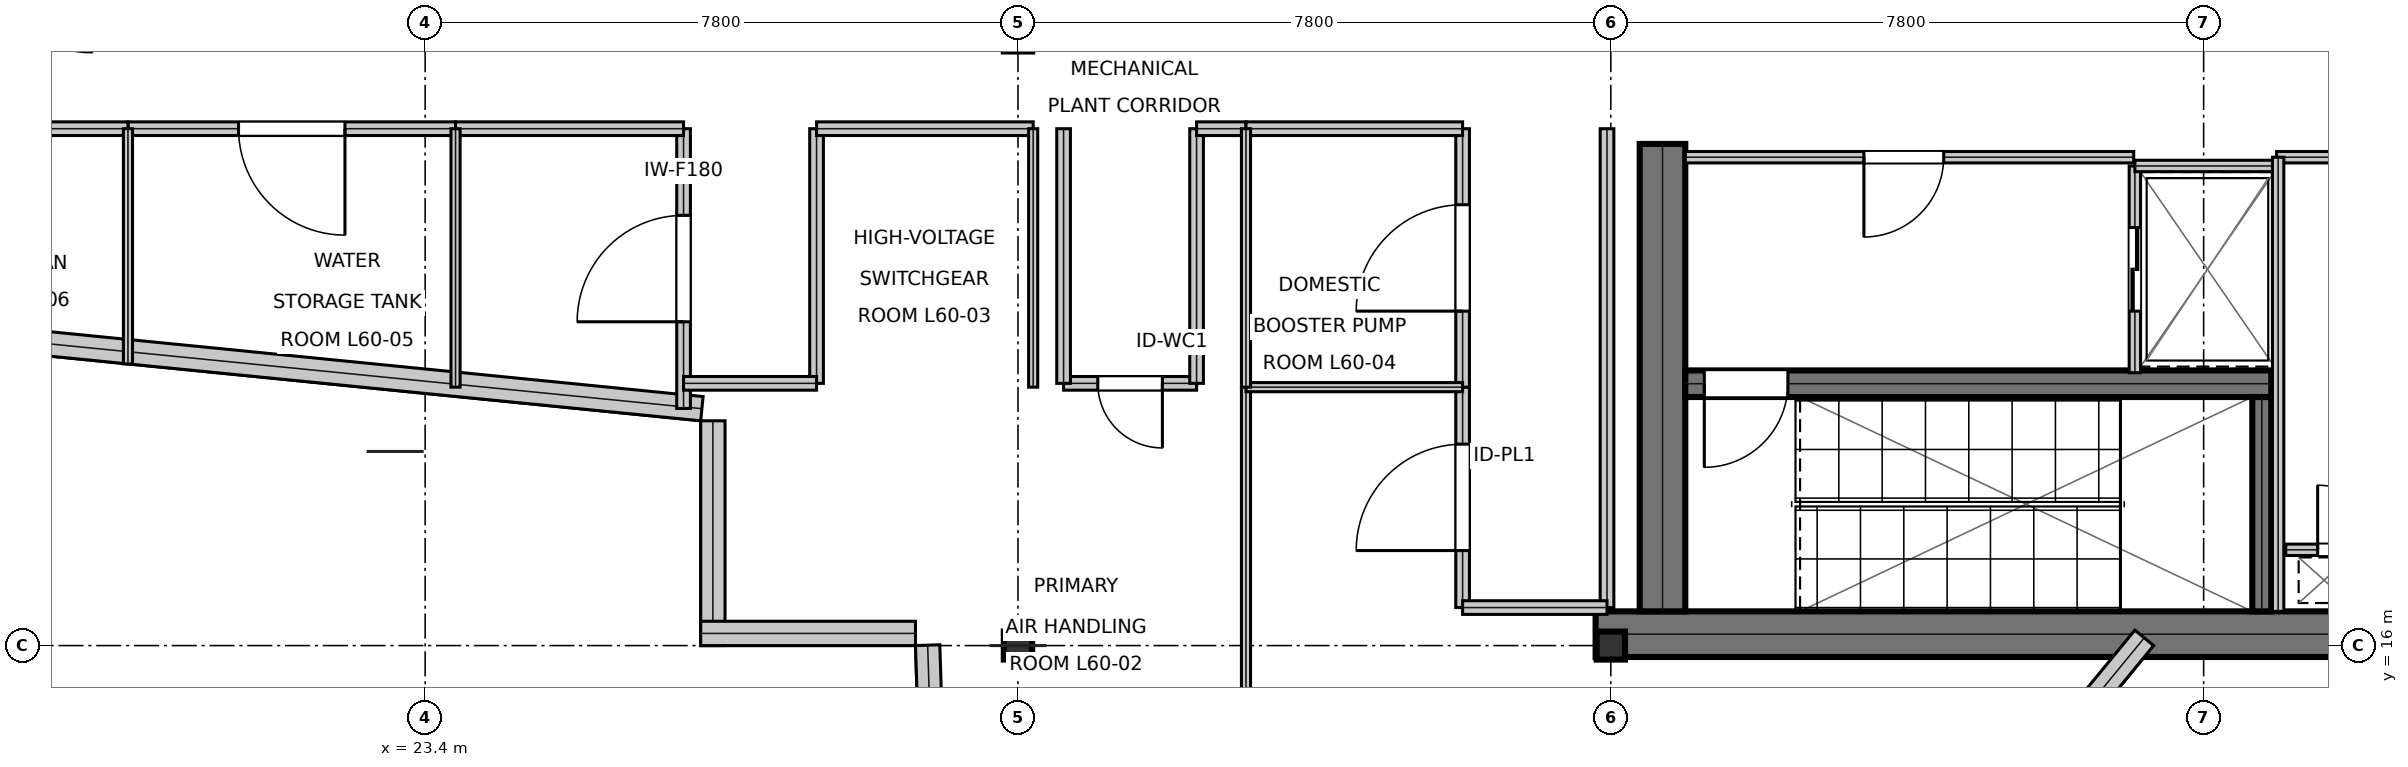
"""IFC4 building model, lengths in metres.
Left out: names, types, materials, properties, quantities, classifications, styles, units other than length and angle.
Written with IfcOpenShell. Run it as: python <this file> out.ifc"""

import sys

from ifc_helpers import new_model, si_unit, direction, frame, frame_2d, origin, origin_2d, place, context, subcontext, project, spatial, rectangle, i_section, extrude, element, fill, save


model = new_model("IFC4")
c1 = context("Model", 3, precision=1e-05, world=origin(), true_north=direction((0.0, 1.0)))
c2 = subcontext(c1, "Body", "Model", "MODEL_VIEW")
j1 = project(units=[si_unit("LENGTHUNIT", "METRE"), si_unit("PLANEANGLEUNIT", "RADIAN")], contexts=[c1])
p1 = place(None, origin())
s1 = spatial("IfcSite", under=j1, at=p1, CompositionType="ELEMENT")
p2 = place(p1, origin())
s2 = spatial("IfcBuilding", under=s1, at=p2, CompositionType="ELEMENT")
p3 = place(p2, frame((0.0, 0.0, 256.65)))
s3 = spatial("IfcBuildingStorey", under=s2, at=p3, CompositionType="ELEMENT", Elevation=256.65)
p4 = place(p3, frame((38.8, 16.15, 0.0), z_axis=(0.0, 0.0, 1.0), x_axis=(1.0, 0.0, 0.0)))
e1 = element("IfcWall", 1, at=p4, inside=s3, PredefinedType="SHEAR", context=c2, shape_type="SweptSolid", body=[
    extrude(rectangle(XDim=16.0, YDim=0.6, at=frame_2d((8.0, 0.0))), origin(), (0.0, 0.0, 1.0), 5.12),
])
p5 = place(p3, frame((39.68, 16.45, 0.0), z_axis=(0.0, 0.0, 1.0), x_axis=(0.0, 1.0, 0.0)))
e2 = element("IfcWall", 2, at=p5, inside=s3, PredefinedType="SHEAR", context=c2, shape_type="SweptSolid", body=[
    extrude(rectangle(XDim=6.15, YDim=0.6, at=frame_2d((3.075, 0.0))), origin(), (0.0, 0.0, 1.0), 5.12),
])
p6 = place(p3, frame((39.98, 19.445, 0.0), z_axis=(0.0, 0.0, 1.0), x_axis=(1.0, 0.0, 0.0)))
e3 = element("IfcWall", 3, at=p6, inside=s3, PredefinedType="SHEAR", context=c2, shape_type="SweptSolid", body=[
    extrude(rectangle(XDim=7.71, YDim=0.35, at=frame_2d((3.855, 0.0))), origin(), (0.0, 0.0, 1.0), 5.12),
])
p7 = place(p6, frame((0.25, 0.0, 0.0)))
e4 = element("IfcOpeningElement", 4, at=p7, cuts=e3, PredefinedType="OPENING", context=c2, shape_type="SweptSolid", body=[
    extrude(rectangle(XDim=1.1, YDim=2.15, at=frame_2d((0.55, 1.075))), frame((0.0, 0.185, 0.0), z_axis=(0.0, -1.0, 0.0), x_axis=(1.0, 0.0, 0.0)), (0.0, 0.0, 1.0), 0.37),
])
p8 = place(p3, frame((47.565, 16.45, 0.0), z_axis=(0.0, 0.0, 1.0), x_axis=(0.0, 1.0, 0.0)))
e5 = element("IfcWall", 5, at=p8, inside=s3, PredefinedType="SHEAR", context=c2, shape_type="SweptSolid", body=[
    extrude(rectangle(XDim=2.82, YDim=0.25, at=frame_2d((1.41, 0.0))), origin(), (0.0, 0.0, 1.0), 5.12),
])
for number, where, z_axis, x_axis in (
    (6, (31.2, 16.0, 0.0), (0.0, 0.0, 1.0), (1.0, 0.0, 0.0)),
    (7, (39.0, 16.0, 0.0), (0.0, 0.0, 1.0), (1.0, 0.0, 0.0)),
):
    element("IfcColumn", number, at=place(p3, frame(where, z_axis=z_axis, x_axis=x_axis)), inside=s3, PredefinedType="COLUMN", context=c2, shape_type="SweptSolid", body=[
        extrude(i_section(OverallWidth=0.373, OverallDepth=0.368, WebThickness=0.015, FlangeThickness=0.024, at=origin_2d()), origin(), (0.0, 0.0, 1.0), 5.394),
    ])
p9 = place(p3, frame((16.376, 20.176, 0.0), z_axis=(0.0, 0.0, 1.0), x_axis=(0.995106185687, -0.098811331369, 0.0)))
e8 = element("IfcWall", 8, at=p9, inside=s3, PredefinedType="STANDARD", context=c2, shape_type="SweptSolid", body=[
    extrude(rectangle(XDim=10.718, YDim=0.32, at=frame_2d((5.359, 0.0))), origin(), (0.0, 0.0, 1.0), 4.649),
])
p10 = place(p3, frame((27.186, 18.958, 0.0), z_axis=(0.0, 0.0, 1.0), x_axis=(0.0, -1.0, 0.0)))
e9 = element("IfcWall", 9, at=p10, inside=s3, PredefinedType="STANDARD", context=c2, shape_type="SweptSolid", body=[
    extrude(rectangle(XDim=2.958, YDim=0.32, at=frame_2d((1.479, 0.0))), origin(), (0.0, 0.0, 1.0), 4.649),
])
p11 = place(p3, frame((27.026, 16.16, 0.0), z_axis=(0.0, 0.0, 1.0), x_axis=(1.0, 0.0, 0.0)))
e10 = element("IfcWall", 10, at=p11, inside=s3, PredefinedType="STANDARD", context=c2, shape_type="SweptSolid", body=[
    extrude(rectangle(XDim=2.826, YDim=0.32, at=frame_2d((1.413, 0.0))), origin(), (0.0, 0.0, 1.0), 5.12),
])
p12 = place(p3, frame((30.012, 16.005, 0.0), z_axis=(0.0, 0.0, 1.0), x_axis=(0.032564460351, -0.999469637319, 0.0)))
e11 = element("IfcWall", 11, at=p12, inside=s3, PredefinedType="STANDARD", context=c2, shape_type="SweptSolid", body=[
    extrude(rectangle(XDim=6.403, YDim=0.32, at=frame_2d((3.201, 0.0))), origin(), (0.0, 0.0, 1.0), 5.12),
])
p13 = place(p3, frame((40.838, 9.801, 0.0), z_axis=(0.0, 0.0, 1.0), x_axis=(0.635089129199, 0.772438863583, 0.0)))
e12 = element("IfcWall", 12, at=p13, inside=s3, PredefinedType="STANDARD", context=c2, shape_type="SweptSolid", body=[
    extrude(rectangle(XDim=8.157, YDim=0.32, at=frame_2d((4.079, 0.0))), origin(), (0.0, 0.0, 1.0), 4.649),
])
p14 = place(p3, frame((39.98, 22.425, 0.0), z_axis=(0.0, 0.0, 1.0), x_axis=(1.0, 0.0, 0.0)))
e13 = element("IfcWall", 13, at=p14, inside=s3, PredefinedType="PARTITIONING", context=c2, shape_type="SweptSolid", body=[
    extrude(rectangle(XDim=5.9, YDim=0.15, at=frame_2d((2.95, 0.0))), origin(), (0.0, 0.0, 1.0), 5.12),
])
p15 = place(p14, frame((2.35, 0.0, 0.0)))
e14 = element("IfcOpeningElement", 14, at=p15, cuts=e13, PredefinedType="OPENING", context=c2, shape_type="SweptSolid", body=[
    extrude(rectangle(XDim=1.05, YDim=2.15, at=frame_2d((0.525, 1.075))), frame((0.0, 0.085, 0.0), z_axis=(0.0, -1.0, 0.0), x_axis=(1.0, 0.0, 0.0)), (0.0, 0.0, 1.0), 0.17),
])
p16 = place(p3, frame((45.895, 19.59, 0.0), z_axis=(0.0, 0.0, 1.0), x_axis=(0.0, 1.0, 0.0)))
e15 = element("IfcWall", 15, at=p16, inside=s3, PredefinedType="PARTITIONING", context=c2, shape_type="SweptSolid", body=[
    extrude(rectangle(XDim=2.72, YDim=0.15, at=frame_2d((1.36, 0.0))), origin(), (0.0, 0.0, 1.0), 5.12),
])
p17 = place(p16, frame((0.81, 0.0, 0.0)))
e16 = element("IfcOpeningElement", 16, at=p17, cuts=e15, PredefinedType="OPENING", context=c2, shape_type="SweptSolid", body=[
    extrude(rectangle(XDim=1.1, YDim=2.15, at=frame_2d((0.55, 1.075))), frame((0.0, 0.085, 0.0), z_axis=(0.0, -1.0, 0.0), x_axis=(1.0, 0.0, 0.0)), (0.0, 0.0, 1.0), 0.17),
])
p18 = place(p3, frame((45.895, 22.31, 0.0), z_axis=(0.0, 0.0, 1.0), x_axis=(1.0, 0.0, 0.0)))
e17 = element("IfcWall", 17, at=p18, inside=s3, PredefinedType="PARTITIONING", context=c2, shape_type="SweptSolid", body=[
    extrude(rectangle(XDim=1.915, YDim=0.15, at=frame_2d((0.958, 0.0))), origin(), (0.0, 0.0, 1.0), 5.12),
])
p19 = place(p3, frame((47.88, 17.26, 0.0), z_axis=(0.0, 0.0, 1.0), x_axis=(1.0, 0.0, 0.0)))
e18 = element("IfcWall", 18, at=p19, inside=s3, PredefinedType="PARTITIONING", context=c2, shape_type="SweptSolid", body=[
    extrude(rectangle(XDim=1.72, YDim=0.15, at=frame_2d((0.86, 0.0))), origin(), (0.0, 0.0, 1.0), 5.12),
])
p20 = place(p19, frame((0.42, 0.0, 0.0)))
e19 = element("IfcOpeningElement", 19, at=p20, cuts=e18, PredefinedType="OPENING", context=c2, shape_type="SweptSolid", body=[
    extrude(rectangle(XDim=0.85, YDim=2.15, at=frame_2d((0.425, 1.075))), frame((0.0, 0.085, 0.0), z_axis=(0.0, -1.0, 0.0), x_axis=(1.0, 0.0, 0.0)), (0.0, 0.0, 1.0), 0.17),
])
p21 = place(p3, frame((47.76, 22.425, 0.0), z_axis=(0.0, 0.0, 1.0), x_axis=(1.0, 0.0, 0.0)))
e20 = element("IfcWall", 20, at=p21, inside=s3, PredefinedType="PARTITIONING", context=c2, shape_type="SweptSolid", body=[
    extrude(rectangle(XDim=1.96, YDim=0.15, at=frame_2d((0.98, 0.0))), origin(), (0.0, 0.0, 1.0), 5.12),
])
p22 = place(p3, frame((47.78, 16.45, 0.0), z_axis=(0.0, 0.0, 1.0), x_axis=(0.0, 1.0, 0.0)))
e21 = element("IfcWall", 21, at=p22, inside=s3, PredefinedType="PARTITIONING", context=c2, shape_type="SweptSolid", body=[
    extrude(rectangle(XDim=5.975, YDim=0.15, at=frame_2d((2.988, 0.0))), origin(), (0.0, 0.0, 1.0), 5.12),
])
p23 = place(p3, frame((37.05, 16.5, 0.0), z_axis=(0.0, 0.0, 1.0), x_axis=(0.0, 1.0, 0.0)))
e22 = element("IfcWall", 22, at=p23, inside=s3, PredefinedType="SOLIDWALL", context=c2, shape_type="SweptSolid", body=[
    extrude(rectangle(XDim=2.9, YDim=0.18, at=frame_2d((1.45, 0.0))), origin(), (0.0, 0.0, 1.0), 4.85),
])
p24 = place(p23, frame((0.75, 0.0, 0.0)))
e23 = element("IfcOpeningElement", 23, at=p24, cuts=e22, PredefinedType="OPENING", context=c2, shape_type="SweptSolid", body=[
    extrude(rectangle(XDim=1.4, YDim=2.2, at=frame_2d((0.7, 1.1))), frame((0.0, 0.1, 0.0), z_axis=(0.0, -1.0, 0.0), x_axis=(1.0, 0.0, 0.0)), (0.0, 0.0, 1.0), 0.2),
])
p25 = place(p3, frame((31.8, 19.45, 0.0), z_axis=(0.0, 0.0, 1.0), x_axis=(1.0, 0.0, 0.0)))
e24 = element("IfcWall", 24, at=p25, inside=s3, PredefinedType="SOLIDWALL", context=c2, shape_type="SweptSolid", body=[
    extrude(rectangle(XDim=1.75, YDim=0.18, at=frame_2d((0.875, 0.0))), origin(), (0.0, 0.0, 1.0), 5.12),
])
p26 = place(p25, frame((0.45, 0.0, 0.0)))
e25 = element("IfcOpeningElement", 25, at=p26, cuts=e24, PredefinedType="OPENING", context=c2, shape_type="SweptSolid", body=[
    extrude(rectangle(XDim=0.85, YDim=2.15, at=frame_2d((0.425, 1.075))), frame((0.0, 0.1, 0.0), z_axis=(0.0, -1.0, 0.0), x_axis=(1.0, 0.0, 0.0)), (0.0, 0.0, 1.0), 0.2),
])
p27 = place(p3, frame((26.8, 19.12, 0.0), z_axis=(0.0, 0.0, 1.0), x_axis=(0.0, 1.0, 0.0)))
e26 = element("IfcWall", 26, at=p27, inside=s3, PredefinedType="SOLIDWALL", context=c2, shape_type="SweptSolid", body=[
    extrude(rectangle(XDim=3.68, YDim=0.18, at=frame_2d((1.84, 0.0))), origin(), (0.0, 0.0, 1.0), 5.12),
])
p28 = place(p27, frame((1.14, 0.0, 0.0)))
e27 = element("IfcOpeningElement", 27, at=p28, cuts=e26, PredefinedType="OPENING", context=c2, shape_type="SweptSolid", body=[
    extrude(rectangle(XDim=1.4, YDim=2.2, at=frame_2d((0.7, 1.1))), frame((0.0, 0.1, 0.0), z_axis=(0.0, -1.0, 0.0), x_axis=(1.0, 0.0, 0.0)), (0.0, 0.0, 1.0), 0.2),
])
p29 = place(p3, frame((37.05, 19.4, 0.0), z_axis=(0.0, 0.0, 1.0), x_axis=(0.0, 1.0, 0.0)))
e28 = element("IfcWall", 28, at=p29, inside=s3, PredefinedType="SOLIDWALL", context=c2, shape_type="SweptSolid", body=[
    extrude(rectangle(XDim=3.4, YDim=0.18, at=frame_2d((1.7, 0.0))), origin(), (0.0, 0.0, 1.0), 4.85),
])
p30 = place(p29, frame((1.0, 0.0, 0.0)))
e29 = element("IfcOpeningElement", 29, at=p30, cuts=e28, PredefinedType="OPENING", context=c2, shape_type="SweptSolid", body=[
    extrude(rectangle(XDim=1.4, YDim=2.2, at=frame_2d((0.7, 1.1))), frame((0.0, 0.1, 0.0), z_axis=(0.0, -1.0, 0.0), x_axis=(1.0, 0.0, 0.0)), (0.0, 0.0, 1.0), 0.2),
])
p31 = place(p3, frame((19.49, 22.8, 0.0), z_axis=(0.0, 0.0, 1.0), x_axis=(1.0, 0.0, 0.0)))
e30 = element("IfcWall", 30, at=p31, inside=s3, PredefinedType="SOLIDWALL", context=c2, shape_type="SweptSolid", body=[
    extrude(rectangle(XDim=4.31, YDim=0.18, at=frame_2d((2.155, 0.0))), origin(), (0.0, 0.0, 1.0), 4.58),
])
p32 = place(p31, frame((1.455, 0.0, 0.0)))
e31 = element("IfcOpeningElement", 31, at=p32, cuts=e30, PredefinedType="OPENING", context=c2, shape_type="SweptSolid", body=[
    extrude(rectangle(XDim=1.4, YDim=2.2, at=frame_2d((0.7, 1.1))), frame((0.0, 0.1, 0.0), z_axis=(0.0, -1.0, 0.0), x_axis=(1.0, 0.0, 0.0)), (0.0, 0.0, 1.0), 0.2),
])
p33 = place(p3, frame((38.95, 16.5, 0.0), z_axis=(0.0, 0.0, 1.0), x_axis=(0.0, 1.0, 0.0)))
e32 = element("IfcWall", 32, at=p33, inside=s3, PredefinedType="SOLIDWALL", context=c2, shape_type="SweptSolid", body=[
    extrude(rectangle(XDim=6.3, YDim=0.18, at=frame_2d((3.15, 0.0))), origin(), (0.0, 0.0, 1.0), 4.85),
])
p34 = place(p3, frame((37.05, 16.5, 0.0), z_axis=(0.0, 0.0, 1.0), x_axis=(1.0, 0.0, 0.0)))
e33 = element("IfcWall", 33, at=p34, inside=s3, PredefinedType="SOLIDWALL", context=c2, shape_type="SweptSolid", body=[
    extrude(rectangle(XDim=1.9, YDim=0.18, at=frame_2d((0.95, 0.0))), origin(), (0.0, 0.0, 1.0), 5.12),
])
for number, where, z_axis, x_axis in (
    (34, (33.55, 19.45, 0.0), (0.0, 0.0, 1.0), (0.0, 1.0, 0.0)),
    (35, (31.8, 19.45, 0.0), (0.0, 0.0, 1.0), (0.0, 1.0, 0.0)),
):
    element("IfcWall", number, at=place(p3, frame(where, z_axis=z_axis, x_axis=x_axis)), inside=s3, PredefinedType="SOLIDWALL", context=c2, shape_type="SweptSolid", body=[
        extrude(rectangle(XDim=3.35, YDim=0.18, at=frame_2d((1.675, 0.0))), origin(), (0.0, 0.0, 1.0), 4.85),
    ])
p35 = place(p3, frame((33.55, 22.8, 0.0), z_axis=(0.0, 0.0, 1.0), x_axis=(1.0, 0.0, 0.0)))
e36 = element("IfcWall", 36, at=p35, inside=s3, PredefinedType="SOLIDWALL", context=c2, shape_type="SweptSolid", body=[
    extrude(rectangle(XDim=0.65, YDim=0.18, at=frame_2d((0.325, 0.0))), origin(), (0.0, 0.0, 1.0), 5.12),
])
p36 = place(p3, frame((28.55, 19.45, 0.0), z_axis=(0.0, 0.0, 1.0), x_axis=(0.0, 1.0, 0.0)))
e37 = element("IfcWall", 37, at=p36, inside=s3, PredefinedType="SOLIDWALL", context=c2, shape_type="SweptSolid", body=[
    extrude(rectangle(XDim=3.35, YDim=0.18, at=frame_2d((1.675, 0.0))), origin(), (0.0, 0.0, 1.0), 5.12),
])
p37 = place(p3, frame((23.8, 22.8, 0.0), z_axis=(0.0, 0.0, 1.0), x_axis=(1.0, 0.0, 0.0)))
e38 = element("IfcWall", 38, at=p37, inside=s3, PredefinedType="SOLIDWALL", context=c2, shape_type="SweptSolid", body=[
    extrude(rectangle(XDim=3.0, YDim=0.18, at=frame_2d((1.5, 0.0))), origin(), (0.0, 0.0, 1.0), 4.58),
])
p38 = place(p3, frame((28.55, 22.8, 0.0), z_axis=(0.0, 0.0, 1.0), x_axis=(1.0, 0.0, 0.0)))
e39 = element("IfcWall", 39, at=p38, inside=s3, PredefinedType="SOLIDWALL", context=c2, shape_type="SweptSolid", body=[
    extrude(rectangle(XDim=2.85, YDim=0.18, at=frame_2d((1.425, 0.0))), origin(), (0.0, 0.0, 1.0), 4.58),
])
p39 = place(p3, frame((26.8, 19.45, 0.0), z_axis=(0.0, 0.0, 1.0), x_axis=(1.0, 0.0, 0.0)))
e40 = element("IfcWall", 40, at=p39, inside=s3, PredefinedType="SOLIDWALL", context=c2, shape_type="SweptSolid", body=[
    extrude(rectangle(XDim=1.75, YDim=0.18, at=frame_2d((0.875, 0.0))), origin(), (0.0, 0.0, 1.0), 5.12),
])
p40 = place(p3, frame((34.2, 22.8, 0.0), z_axis=(0.0, 0.0, 1.0), x_axis=(1.0, 0.0, 0.0)))
e41 = element("IfcWall", 41, at=p40, inside=s3, PredefinedType="SOLIDWALL", context=c2, shape_type="SweptSolid", body=[
    extrude(rectangle(XDim=2.85, YDim=0.18, at=frame_2d((1.425, 0.0))), origin(), (0.0, 0.0, 1.0), 5.12),
])
p41 = place(p3, frame((16.5, 22.8, 0.0), z_axis=(0.0, 0.0, 1.0), x_axis=(1.0, 0.0, 0.0)))
e42 = element("IfcWall", 42, at=p41, inside=s3, PredefinedType="SOLIDWALL", context=c2, shape_type="SweptSolid", body=[
    extrude(rectangle(XDim=2.99, YDim=0.18, at=frame_2d((1.495, 0.0))), origin(), (0.0, 0.0, 1.0), 5.12),
])
p42 = place(p3, frame((34.2, 8.854, 0.0), z_axis=(0.0, 0.0, 1.0), x_axis=(0.0, 1.0, 0.0)))
e43 = element("IfcWall", 43, at=p42, inside=s3, PredefinedType="PARTITIONING", context=c2, shape_type="SweptSolid", body=[
    extrude(rectangle(XDim=10.546, YDim=0.12, at=frame_2d((5.273, 0.0))), origin(), (0.0, 0.0, 1.0), 4.58),
])
p43 = place(p3, frame((34.2, 19.4, 0.0), z_axis=(0.0, 0.0, 1.0), x_axis=(1.0, 0.0, 0.0)))
e44 = element("IfcWall", 44, at=p43, inside=s3, PredefinedType="PARTITIONING", context=c2, shape_type="SweptSolid", body=[
    extrude(rectangle(XDim=2.85, YDim=0.12, at=frame_2d((1.425, 0.0))), origin(), (0.0, 0.0, 1.0), 5.12),
])
p44 = place(p3, frame((31.4, 19.4, 0.0), z_axis=(0.0, 0.0, 1.0), x_axis=(0.0, 1.0, 0.0)))
e45 = element("IfcWall", 45, at=p44, inside=s3, PredefinedType="PARTITIONING", context=c2, shape_type="SweptSolid", body=[
    extrude(rectangle(XDim=3.4, YDim=0.12, at=frame_2d((1.7, 0.0))), origin(), (0.0, 0.0, 1.0), 4.58),
])
p45 = place(p3, frame((34.2, 19.4, 0.0), z_axis=(0.0, 0.0, 1.0), x_axis=(0.0, 1.0, 0.0)))
e46 = element("IfcWall", 46, at=p45, inside=s3, PredefinedType="PARTITIONING", context=c2, shape_type="SweptSolid", body=[
    extrude(rectangle(XDim=3.4, YDim=0.12, at=frame_2d((1.7, 0.0))), origin(), (0.0, 0.0, 1.0), 5.12),
])
p46 = place(p3, frame((23.8, 19.4, 0.0), z_axis=(0.0, 0.0, 1.0), x_axis=(0.0, 1.0, 0.0)))
e47 = element("IfcWall", 47, at=p46, inside=s3, PredefinedType="PARTITIONING", context=c2, shape_type="SweptSolid", body=[
    extrude(rectangle(XDim=3.4, YDim=0.12, at=frame_2d((1.7, 0.0))), origin(), (0.0, 0.0, 1.0), 4.58),
])
p47 = place(p3, frame((19.49, 19.706, 0.0), z_axis=(0.0, 0.0, 1.0), x_axis=(0.0, 1.0, 0.0)))
e48 = element("IfcWall", 48, at=p47, inside=s3, PredefinedType="PARTITIONING", context=c2, shape_type="SweptSolid", body=[
    extrude(rectangle(XDim=3.094, YDim=0.12, at=frame_2d((1.547, 0.0))), origin(), (0.0, 0.0, 1.0), 4.58),
])
p48 = place(p15, frame((1.05, 0.0, 0.0), z_axis=(0.0, 0.0, 1.0), x_axis=(-1.0, 0.0, 0.0)))
e49 = element("IfcDoor", 49, at=p48, inside=s3, OperationType="SINGLE_SWING_RIGHT", PredefinedType="DOOR", context=c2, shape_type="SweptSolid", body=[
    extrude(rectangle(XDim=1.05, YDim=2.15, at=frame_2d((0.525, 1.075))), frame((0.0, 0.025, 0.0), z_axis=(0.0, -1.0, 0.0), x_axis=(1.0, 0.0, 0.0)), (0.0, 0.0, 1.0), 0.05),
])
fill(e14, e49)
p49 = place(p17, frame((1.1, 0.0, 0.0), z_axis=(0.0, 0.0, 1.0), x_axis=(-1.0, 0.0, 0.0)))
e50 = element("IfcDoor", 50, at=p49, inside=s3, OperationType="DOUBLE_DOOR_SLIDING", PredefinedType="DOOR", context=c2, shape_type="SweptSolid", body=[
    extrude(rectangle(XDim=1.1, YDim=2.15, at=frame_2d((0.55, 1.075))), frame((0.0, 0.025, 0.0), z_axis=(0.0, -1.0, 0.0), x_axis=(1.0, 0.0, 0.0)), (0.0, 0.0, 1.0), 0.05),
])
fill(e16, e50)
p50 = place(p20, origin())
e51 = element("IfcDoor", 51, at=p50, inside=s3, OperationType="SINGLE_SWING_LEFT", PredefinedType="TRAPDOOR", context=c2, shape_type="SweptSolid", body=[
    extrude(rectangle(XDim=0.85, YDim=2.15, at=frame_2d((0.425, 1.075))), frame((0.0, 0.025, 0.0), z_axis=(0.0, -1.0, 0.0), x_axis=(1.0, 0.0, 0.0)), (0.0, 0.0, 1.0), 0.05),
])
fill(e19, e51)
p51 = place(p24, origin())
e52 = element("IfcDoor", 52, at=p51, inside=s3, OperationType="SINGLE_SWING_LEFT", PredefinedType="DOOR", context=c2, shape_type="SweptSolid", body=[
    extrude(rectangle(XDim=1.4, YDim=2.2, at=frame_2d((0.7, 1.1))), frame((0.0, 0.025, 0.0), z_axis=(0.0, -1.0, 0.0), x_axis=(1.0, 0.0, 0.0)), (0.0, 0.0, 1.0), 0.05),
])
fill(e23, e52)
p52 = place(p26, frame((0.85, 0.0, 0.0), z_axis=(0.0, 0.0, 1.0), x_axis=(-1.0, 0.0, 0.0)))
e53 = element("IfcDoor", 53, at=p52, inside=s3, OperationType="SINGLE_SWING_LEFT", PredefinedType="DOOR", context=c2, shape_type="SweptSolid", body=[
    extrude(rectangle(XDim=0.85, YDim=2.15, at=frame_2d((0.425, 1.075))), frame((0.0, 0.025, 0.0), z_axis=(0.0, -1.0, 0.0), x_axis=(1.0, 0.0, 0.0)), (0.0, 0.0, 1.0), 0.05),
])
fill(e25, e53)
p53 = place(p28, origin())
e54 = element("IfcDoor", 54, at=p53, inside=s3, OperationType="SINGLE_SWING_LEFT", PredefinedType="DOOR", context=c2, shape_type="SweptSolid", body=[
    extrude(rectangle(XDim=1.4, YDim=2.2, at=frame_2d((0.7, 1.1))), frame((0.0, 0.025, 0.0), z_axis=(0.0, -1.0, 0.0), x_axis=(1.0, 0.0, 0.0)), (0.0, 0.0, 1.0), 0.05),
])
fill(e27, e54)
p54 = place(p30, origin())
e55 = element("IfcDoor", 55, at=p54, inside=s3, OperationType="SINGLE_SWING_LEFT", PredefinedType="DOOR", context=c2, shape_type="SweptSolid", body=[
    extrude(rectangle(XDim=1.4, YDim=2.2, at=frame_2d((0.7, 1.1))), frame((0.0, 0.025, 0.0), z_axis=(0.0, -1.0, 0.0), x_axis=(1.0, 0.0, 0.0)), (0.0, 0.0, 1.0), 0.05),
])
fill(e29, e55)
p55 = place(p32, frame((1.4, 0.0, 0.0), z_axis=(0.0, 0.0, 1.0), x_axis=(-1.0, 0.0, 0.0)))
e56 = element("IfcDoor", 56, at=p55, inside=s3, OperationType="SINGLE_SWING_LEFT", PredefinedType="DOOR", context=c2, shape_type="SweptSolid", body=[
    extrude(rectangle(XDim=1.4, YDim=2.2, at=frame_2d((0.7, 1.1))), frame((0.0, 0.025, 0.0), z_axis=(0.0, -1.0, 0.0), x_axis=(1.0, 0.0, 0.0)), (0.0, 0.0, 1.0), 0.05),
])
fill(e31, e56)
p56 = place(p7, frame((1.1, 0.0, 0.0), z_axis=(0.0, 0.0, 1.0), x_axis=(-1.0, 0.0, 0.0)))
e57 = element("IfcDoor", 57, at=p56, inside=s3, OperationType="SINGLE_SWING_RIGHT", PredefinedType="DOOR", context=c2, shape_type="SweptSolid", body=[
    extrude(rectangle(XDim=1.1, YDim=2.15, at=frame_2d((0.55, 1.075))), frame((0.0, 0.025, 0.0), z_axis=(0.0, -1.0, 0.0), x_axis=(1.0, 0.0, 0.0)), (0.0, 0.0, 1.0), 0.05),
])
fill(e4, e57)
save(model, sys.argv[1])
